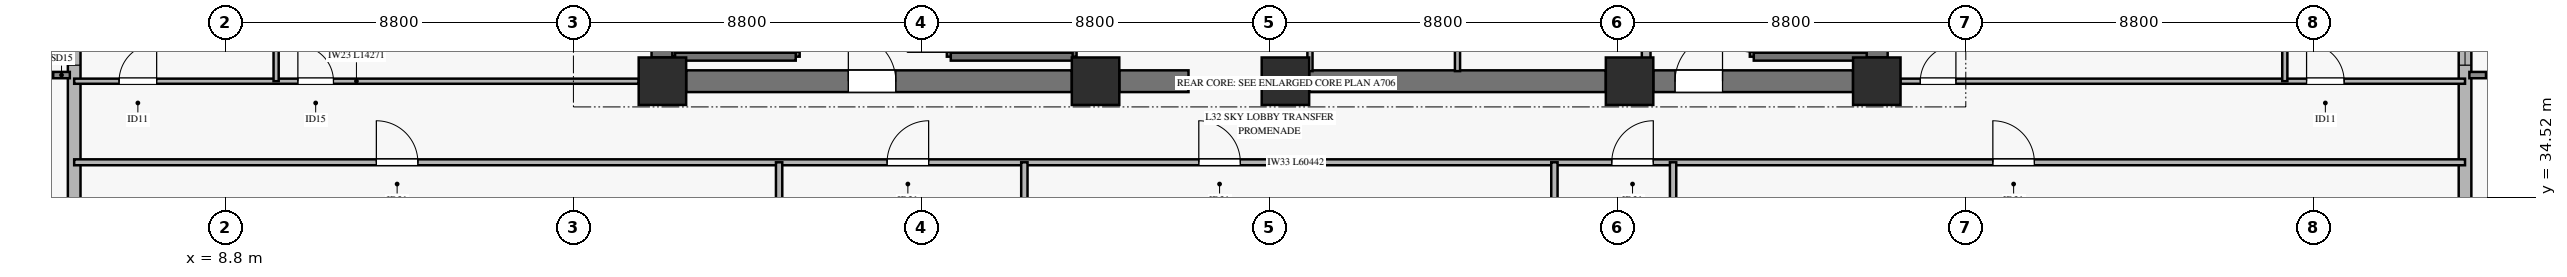
"""IFC4 building model, lengths in metres.
Left out: names, types, materials, properties, quantities, classifications, styles, units other than length and angle.
Written with IfcOpenShell. Run it as: python <this file> out.ifc"""

import sys

from ifc_helpers import new_model, si_unit, direction, frame, frame_2d, origin, origin_2d, place, context, subcontext, project, spatial, rectangle, extrude, source, transform, mapped, element, fill, save


model = new_model("IFC4")
c1 = context("Model", 3, precision=1e-05, world=origin(), true_north=direction((0.0, 1.0)))
c2 = subcontext(c1, "Body", "Model", "MODEL_VIEW")
j1 = project(units=[si_unit("LENGTHUNIT", "METRE"), si_unit("PLANEANGLEUNIT", "RADIAN")], contexts=[c1])
p1 = place(None, origin())
s1 = spatial("IfcSite", under=j1, at=p1, CompositionType="ELEMENT")
p2 = place(p1, origin())
s2 = spatial("IfcBuilding", under=s1, at=p2, CompositionType="ELEMENT")
p3 = place(p2, frame((0.0, 0.0, 130.9)))
s3 = spatial("IfcBuildingStorey", under=s2, at=p3, CompositionType="ELEMENT", Elevation=130.9)
m1 = source(origin(), c2, "Body", "SweptSolid", [
    extrude(rectangle(XDim=1.2, YDim=1.2, at=origin_2d()), origin(), (0.0, 0.0, 1.0), 6.57),
])
for number, where, z_axis, x_axis in (
    (1, (19.85, 37.45, 0.0), (0.0, 0.0, 1.0), (1.0, 0.0, 0.0)),
    (2, (30.8, 37.45, 0.0), (0.0, 0.0, 1.0), (1.0, 0.0, 0.0)),
    (3, (35.6, 37.45, 0.0), (0.0, 0.0, 1.0), (1.0, 0.0, 0.0)),
    (4, (44.3, 37.45, 0.0), (0.0, 0.0, 1.0), (1.0, 0.0, 0.0)),
    (5, (50.55, 37.45, 0.0), (0.0, 0.0, 1.0), (1.0, 0.0, 0.0)),
):
    element("IfcColumn", number, at=place(p3, frame(where, z_axis=z_axis, x_axis=x_axis)), inside=s3, PredefinedType="PILASTER", context=c2, shape_type="MappedRepresentation", body=[
        mapped(m1, transform((0.0, 0.0, 0.0), x_axis=(1.0, 0.0, 0.0), y_axis=(0.0, 1.0, 0.0), z_axis=(0.0, 0.0, 1.0), scale=1.0)),
    ])
p4 = place(p3, frame((20.45, 37.45, 0.0), z_axis=(0.0, 0.0, 1.0), x_axis=(1.0, 0.0, 0.0)))
e6 = element("IfcWall", 6, at=p4, inside=s3, PredefinedType="SHEAR", context=c2, shape_type="SweptSolid", body=[
    extrude(rectangle(XDim=9.75, YDim=0.55, at=frame_2d((4.875, 0.0))), origin(), (0.0, 0.0, 1.0), 6.57),
])
p5 = place(p4, frame((4.1, 0.0, 0.0)))
e7 = element("IfcOpeningElement", 7, at=p5, cuts=e6, PredefinedType="OPENING", context=c2, shape_type="SweptSolid", body=[
    extrude(rectangle(XDim=1.2, YDim=2.15, at=frame_2d((0.6, 1.075))), frame((0.0, 0.285, 0.0), z_axis=(0.0, -1.0, 0.0), x_axis=(1.0, 0.0, 0.0)), (0.0, 0.0, 1.0), 0.57),
])
p6 = place(p3, frame((31.4, 37.45, 0.0), z_axis=(0.0, 0.0, 1.0), x_axis=(1.0, 0.0, 0.0)))
e8 = element("IfcWall", 8, at=p6, inside=s3, PredefinedType="SHEAR", context=c2, shape_type="SweptSolid", body=[
    extrude(rectangle(XDim=1.75, YDim=0.55, at=frame_2d((0.875, 0.0))), origin(), (0.0, 0.0, 1.0), 6.57),
])
p7 = place(p3, frame((36.2, 37.45, 0.0), z_axis=(0.0, 0.0, 1.0), x_axis=(1.0, 0.0, 0.0)))
e9 = element("IfcWall", 9, at=p7, inside=s3, PredefinedType="SHEAR", context=c2, shape_type="SweptSolid", body=[
    extrude(rectangle(XDim=7.5, YDim=0.55, at=frame_2d((3.75, 0.0))), origin(), (0.0, 0.0, 1.0), 6.57),
])
p8 = place(p3, frame((44.9, 37.45, 0.0), z_axis=(0.0, 0.0, 1.0), x_axis=(1.0, 0.0, 0.0)))
e10 = element("IfcWall", 10, at=p8, inside=s3, PredefinedType="SHEAR", context=c2, shape_type="SweptSolid", body=[
    extrude(rectangle(XDim=5.05, YDim=0.55, at=frame_2d((2.525, 0.0))), origin(), (0.0, 0.0, 1.0), 6.57),
])
p9 = place(p8, frame((0.55, 0.0, 0.0)))
e11 = element("IfcOpeningElement", 11, at=p9, cuts=e10, PredefinedType="OPENING", context=c2, shape_type="SweptSolid", body=[
    extrude(rectangle(XDim=1.2, YDim=2.15, at=frame_2d((0.6, 1.075))), frame((0.0, 0.285, 0.0), z_axis=(0.0, -1.0, 0.0), x_axis=(1.0, 0.0, 0.0)), (0.0, 0.0, 1.0), 0.57),
])
for number, where, z_axis, x_axis in (
    (12, (19.85, 38.05, 0.0), (0.0, 0.0, 1.0), (0.0, 1.0, 0.0)),
    (13, (50.55, 38.05, 0.0), (0.0, 0.0, 1.0), (0.0, 1.0, 0.0)),
):
    element("IfcWall", number, at=place(p3, frame(where, z_axis=z_axis, x_axis=x_axis)), inside=s3, PredefinedType="SHEAR", context=c2, shape_type="SweptSolid", body=[
        extrude(rectangle(XDim=7.9, YDim=0.55, at=frame_2d((3.95, 0.0))), origin(), (0.0, 0.0, 1.0), 6.57),
    ])
p10 = place(p3, frame((4.979, 27.259, 0.0), z_axis=(0.0, 0.0, 1.0), x_axis=(0.0, 1.0, 0.0)))
e14 = element("IfcWall", 14, at=p10, inside=s3, PredefinedType="SOLIDWALL", context=c2, shape_type="SweptSolid", body=[
    extrude(rectangle(XDim=15.85, YDim=0.32, at=frame_2d((7.925, 0.0))), origin(), (0.0, 0.0, 1.0), 6.05),
])
p11 = place(p10, frame((10.596, 0.0, 0.45)))
e15 = element("IfcOpeningElement", 15, at=p11, cuts=e14, PredefinedType="OPENING", context=c2, shape_type="SweptSolid", body=[
    extrude(rectangle(XDim=2.6, YDim=2.4, at=frame_2d((1.3, 1.2))), frame((0.0, 0.17, 0.0), z_axis=(0.0, -1.0, 0.0), x_axis=(1.0, 0.0, 0.0)), (0.0, 0.0, 1.0), 0.34),
])
p12 = place(p3, frame((65.421, 27.259, 0.0), z_axis=(0.0, 0.0, 1.0), x_axis=(0.0, 1.0, 0.0)))
e16 = element("IfcWall", 16, at=p12, inside=s3, PredefinedType="SOLIDWALL", context=c2, shape_type="SweptSolid", body=[
    extrude(rectangle(XDim=15.85, YDim=0.32, at=frame_2d((7.925, 0.0))), origin(), (0.0, 0.0, 1.0), 6.05),
])
p13 = place(p12, frame((10.596, 0.0, 0.45)))
e17 = element("IfcOpeningElement", 17, at=p13, cuts=e16, PredefinedType="OPENING", context=c2, shape_type="SweptSolid", body=[
    extrude(rectangle(XDim=2.6, YDim=2.4, at=frame_2d((1.3, 1.2))), frame((0.0, 0.17, 0.0), z_axis=(0.0, -1.0, 0.0), x_axis=(1.0, 0.0, 0.0)), (0.0, 0.0, 1.0), 0.34),
])
p14 = place(p3, frame((20.17, 38.07, 0.0), z_axis=(0.0, 0.0, 1.0), x_axis=(0.0, 1.0, 0.0)))
e18 = element("IfcWall", 18, at=p14, inside=s3, PredefinedType="SOLIDWALL", context=c2, shape_type="SweptSolid", body=[
    extrude(rectangle(XDim=7.25, YDim=0.14, at=frame_2d((3.625, 0.0))), origin(), (0.0, 0.0, 1.0), 6.8),
])
p15 = place(p3, frame((23.22, 38.07, 0.0), z_axis=(0.0, 0.0, 1.0), x_axis=(0.0, 1.0, 0.0)))
e19 = element("IfcWall", 19, at=p15, inside=s3, PredefinedType="SOLIDWALL", context=c2, shape_type="SweptSolid", body=[
    extrude(rectangle(XDim=7.25, YDim=0.2, at=frame_2d((3.625, 0.0))), origin(), (0.0, 0.0, 1.0), 6.8),
])
p16 = place(p15, frame((0.11, 0.0, 0.0)))
e20 = element("IfcOpeningElement", 20, at=p16, cuts=e19, PredefinedType="OPENING", context=c2, shape_type="SweptSolid", body=[
    extrude(rectangle(XDim=1.1, YDim=2.15, at=frame_2d((0.55, 1.075))), frame((0.0, 0.11, 0.0), z_axis=(0.0, -1.0, 0.0), x_axis=(1.0, 0.0, 0.0)), (0.0, 0.0, 1.0), 0.22),
])
p17 = place(p3, frame((20.17, 38.07, 0.0), z_axis=(0.0, 0.0, 1.0), x_axis=(1.0, 0.0, 0.0)))
e21 = element("IfcWall", 21, at=p17, inside=s3, PredefinedType="SOLIDWALL", context=c2, shape_type="SweptSolid", body=[
    extrude(rectangle(XDim=3.05, YDim=0.2, at=frame_2d((1.525, 0.0))), origin(), (0.0, 0.0, 1.0), 6.8),
])
p18 = place(p3, frame((27.14, 38.07, 0.0), z_axis=(0.0, 0.0, 1.0), x_axis=(0.0, 1.0, 0.0)))
e22 = element("IfcWall", 22, at=p18, inside=s3, PredefinedType="SOLIDWALL", context=c2, shape_type="SweptSolid", body=[
    extrude(rectangle(XDim=7.25, YDim=0.2, at=frame_2d((3.625, 0.0))), origin(), (0.0, 0.0, 1.0), 6.8),
])
p19 = place(p18, frame((0.11, 0.0, 0.0)))
e23 = element("IfcOpeningElement", 23, at=p19, cuts=e22, PredefinedType="OPENING", context=c2, shape_type="SweptSolid", body=[
    extrude(rectangle(XDim=1.1, YDim=2.15, at=frame_2d((0.55, 1.075))), frame((0.0, 0.11, 0.0), z_axis=(0.0, -1.0, 0.0), x_axis=(1.0, 0.0, 0.0)), (0.0, 0.0, 1.0), 0.22),
])
p20 = place(p3, frame((30.22, 38.07, 0.0), z_axis=(0.0, 0.0, 1.0), x_axis=(0.0, 1.0, 0.0)))
e24 = element("IfcWall", 24, at=p20, inside=s3, PredefinedType="SOLIDWALL", context=c2, shape_type="SweptSolid", body=[
    extrude(rectangle(XDim=7.25, YDim=0.2, at=frame_2d((3.625, 0.0))), origin(), (0.0, 0.0, 1.0), 6.8),
])
p21 = place(p3, frame((27.14, 38.07, 0.0), z_axis=(0.0, 0.0, 1.0), x_axis=(1.0, 0.0, 0.0)))
e25 = element("IfcWall", 25, at=p21, inside=s3, PredefinedType="SOLIDWALL", context=c2, shape_type="SweptSolid", body=[
    extrude(rectangle(XDim=3.08, YDim=0.2, at=frame_2d((1.54, 0.0))), origin(), (0.0, 0.0, 1.0), 6.8),
])
p22 = place(p3, frame((47.44, 38.07, 0.0), z_axis=(0.0, 0.0, 1.0), x_axis=(0.0, 1.0, 0.0)))
e26 = element("IfcWall", 26, at=p22, inside=s3, PredefinedType="SOLIDWALL", context=c2, shape_type="SweptSolid", body=[
    extrude(rectangle(XDim=7.25, YDim=0.2, at=frame_2d((3.625, 0.0))), origin(), (0.0, 0.0, 1.0), 6.8),
])
p23 = place(p22, frame((0.11, 0.0, 0.0)))
e27 = element("IfcOpeningElement", 27, at=p23, cuts=e26, PredefinedType="OPENING", context=c2, shape_type="SweptSolid", body=[
    extrude(rectangle(XDim=1.1, YDim=2.15, at=frame_2d((0.55, 1.075))), frame((0.0, 0.11, 0.0), z_axis=(0.0, -1.0, 0.0), x_axis=(1.0, 0.0, 0.0)), (0.0, 0.0, 1.0), 0.22),
])
p24 = place(p3, frame((47.44, 38.07, 0.0), z_axis=(0.0, 0.0, 1.0), x_axis=(1.0, 0.0, 0.0)))
e28 = element("IfcWall", 28, at=p24, inside=s3, PredefinedType="SOLIDWALL", context=c2, shape_type="SweptSolid", body=[
    extrude(rectangle(XDim=2.855, YDim=0.2, at=frame_2d((1.427, 0.0))), origin(), (0.0, 0.0, 1.0), 6.8),
])
p25 = place(p3, frame((44.72, 37.705, 0.0), z_axis=(0.0, 0.0, 1.0), x_axis=(0.0, 1.0, 0.0)))
e29 = element("IfcWall", 29, at=p25, inside=s3, PredefinedType="SOLIDWALL", context=c2, shape_type="SweptSolid", body=[
    extrude(rectangle(XDim=7.515, YDim=0.22, at=frame_2d((3.757, 0.0))), origin(), (0.0, 0.0, 1.0), 6.57),
])
p26 = place(p3, frame((36.22, 37.705, 0.0), z_axis=(0.0, 0.0, 1.0), x_axis=(0.0, 1.0, 0.0)))
e30 = element("IfcWall", 30, at=p26, inside=s3, PredefinedType="PARTITIONING", context=c2, shape_type="SweptSolid", body=[
    extrude(rectangle(XDim=2.215, YDim=0.13, at=frame_2d((1.107, 0.0))), origin(), (0.0, 0.0, 1.0), 6.57),
])
p27 = place(p26, frame((0.905, 0.0, 0.0)))
e31 = element("IfcOpeningElement", 31, at=p27, cuts=e30, PredefinedType="OPENING", context=c2, shape_type="SweptSolid", body=[
    extrude(rectangle(XDim=0.9, YDim=2.1, at=frame_2d((0.45, 1.05))), frame((0.0, 0.075, 0.0), z_axis=(0.0, -1.0, 0.0), x_axis=(1.0, 0.0, 0.0)), (0.0, 0.0, 1.0), 0.15),
])
p28 = place(p3, frame((39.95, 37.705, 0.0), z_axis=(0.0, 0.0, 1.0), x_axis=(0.0, 1.0, 0.0)))
e32 = element("IfcWall", 32, at=p28, inside=s3, PredefinedType="PARTITIONING", context=c2, shape_type="SweptSolid", body=[
    extrude(rectangle(XDim=2.215, YDim=0.13, at=frame_2d((1.107, 0.0))), origin(), (0.0, 0.0, 1.0), 6.57),
])
p29 = place(p28, frame((0.615, 0.0, 0.0)))
e33 = element("IfcOpeningElement", 33, at=p29, cuts=e32, PredefinedType="OPENING", context=c2, shape_type="SweptSolid", body=[
    extrude(rectangle(XDim=0.9, YDim=2.1, at=frame_2d((0.45, 1.05))), frame((0.0, 0.075, 0.0), z_axis=(0.0, -1.0, 0.0), x_axis=(1.0, 0.0, 0.0)), (0.0, 0.0, 1.0), 0.15),
])
p30 = place(p3, frame((4.979, 35.4, 0.0), z_axis=(0.0, 0.0, 1.0), x_axis=(1.0, 0.0, 0.0)))
e34 = element("IfcWall", 34, at=p30, inside=s3, PredefinedType="PARTITIONING", context=c2, shape_type="SweptSolid", body=[
    extrude(rectangle(XDim=60.442, YDim=0.15, at=frame_2d((30.221, 0.0))), origin(), (0.0, 0.0, 1.0), 5.655),
])
p31 = place(p30, frame((7.639, 0.0, 0.0)))
e35 = element("IfcOpeningElement", 35, at=p31, cuts=e34, PredefinedType="OPENING", context=c2, shape_type="SweptSolid", body=[
    extrude(rectangle(XDim=1.05, YDim=2.15, at=frame_2d((0.525, 1.075))), frame((0.0, 0.085, 0.0), z_axis=(0.0, -1.0, 0.0), x_axis=(1.0, 0.0, 0.0)), (0.0, 0.0, 1.0), 0.17),
])
p32 = place(p30, frame((20.551, 0.0, 0.0)))
e36 = element("IfcOpeningElement", 36, at=p32, cuts=e34, PredefinedType="OPENING", context=c2, shape_type="SweptSolid", body=[
    extrude(rectangle(XDim=1.05, YDim=2.15, at=frame_2d((0.525, 1.075))), frame((0.0, 0.085, 0.0), z_axis=(0.0, -1.0, 0.0), x_axis=(1.0, 0.0, 0.0)), (0.0, 0.0, 1.0), 0.17),
])
p33 = place(p30, frame((28.431, 0.0, 0.0)))
e37 = element("IfcOpeningElement", 37, at=p33, cuts=e34, PredefinedType="OPENING", context=c2, shape_type="SweptSolid", body=[
    extrude(rectangle(XDim=1.05, YDim=2.15, at=frame_2d((0.525, 1.075))), frame((0.0, 0.085, 0.0), z_axis=(0.0, -1.0, 0.0), x_axis=(1.0, 0.0, 0.0)), (0.0, 0.0, 1.0), 0.17),
])
p34 = place(p30, frame((38.871, 0.0, 0.0)))
e38 = element("IfcOpeningElement", 38, at=p34, cuts=e34, PredefinedType="OPENING", context=c2, shape_type="SweptSolid", body=[
    extrude(rectangle(XDim=1.05, YDim=2.15, at=frame_2d((0.525, 1.075))), frame((0.0, 0.085, 0.0), z_axis=(0.0, -1.0, 0.0), x_axis=(1.0, 0.0, 0.0)), (0.0, 0.0, 1.0), 0.17),
])
p35 = place(p30, frame((48.505, 0.0, 0.0)))
e39 = element("IfcOpeningElement", 39, at=p35, cuts=e34, PredefinedType="OPENING", context=c2, shape_type="SweptSolid", body=[
    extrude(rectangle(XDim=1.05, YDim=2.15, at=frame_2d((0.525, 1.075))), frame((0.0, 0.085, 0.0), z_axis=(0.0, -1.0, 0.0), x_axis=(1.0, 0.0, 0.0)), (0.0, 0.0, 1.0), 0.17),
])
for number, where, z_axis, x_axis in (
    (40, (22.8, 7.518, 0.0), (0.0, 0.0, 1.0), (0.0, 1.0, 0.0)),
    (41, (29.0, 7.518, 0.0), (0.0, 0.0, 1.0), (0.0, 1.0, 0.0)),
    (42, (42.4, 7.518, 0.0), (0.0, 0.0, 1.0), (0.0, 1.0, 0.0)),
    (43, (45.4, 7.518, 0.0), (0.0, 0.0, 1.0), (0.0, 1.0, 0.0)),
):
    element("IfcWall", number, at=place(p3, frame(where, z_axis=z_axis, x_axis=x_axis)), inside=s3, PredefinedType="PARTITIONING", context=c2, shape_type="SweptSolid", body=[
        extrude(rectangle(XDim=27.882, YDim=0.16, at=frame_2d((13.941, 0.0))), origin(), (0.0, 0.0, 1.0), 6.055),
    ])
p36 = place(p3, frame((4.979, 37.45, 0.0), z_axis=(0.0, 0.0, 1.0), x_axis=(1.0, 0.0, 0.0)))
e44 = element("IfcWall", 44, at=p36, inside=s3, PredefinedType="PARTITIONING", context=c2, shape_type="SweptSolid", body=[
    extrude(rectangle(XDim=14.271, YDim=0.13, at=frame_2d((7.135, 0.0))), origin(), (0.0, 0.0, 1.0), 6.055),
])
p37 = place(p36, frame((1.135, 0.0, 0.0)))
e45 = element("IfcOpeningElement", 45, at=p37, cuts=e44, PredefinedType="OPENING", context=c2, shape_type="SweptSolid", body=[
    extrude(rectangle(XDim=0.95, YDim=2.1, at=frame_2d((0.475, 1.05))), frame((0.0, 0.075, 0.0), z_axis=(0.0, -1.0, 0.0), x_axis=(1.0, 0.0, 0.0)), (0.0, 0.0, 1.0), 0.15),
])
p38 = place(p36, frame((5.655, 0.0, 0.0)))
e46 = element("IfcOpeningElement", 46, at=p38, cuts=e44, PredefinedType="OPENING", context=c2, shape_type="SweptSolid", body=[
    extrude(rectangle(XDim=0.9, YDim=2.1, at=frame_2d((0.45, 1.05))), frame((0.0, 0.075, 0.0), z_axis=(0.0, -1.0, 0.0), x_axis=(1.0, 0.0, 0.0)), (0.0, 0.0, 1.0), 0.15),
])
p39 = place(p3, frame((10.084, 37.45, 0.0), z_axis=(0.0, 0.0, 1.0), x_axis=(0.0, 1.0, 0.0)))
e47 = element("IfcWall", 47, at=p39, inside=s3, PredefinedType="PARTITIONING", context=c2, shape_type="SweptSolid", body=[
    extrude(rectangle(XDim=8.8, YDim=0.13, at=frame_2d((4.4, 0.0))), origin(), (0.0, 0.0, 1.0), 6.57),
])
p40 = place(p3, frame((51.15, 37.45, 0.0), z_axis=(0.0, 0.0, 1.0), x_axis=(1.0, 0.0, 0.0)))
e48 = element("IfcWall", 48, at=p40, inside=s3, PredefinedType="PARTITIONING", context=c2, shape_type="SweptSolid", body=[
    extrude(rectangle(XDim=14.271, YDim=0.13, at=frame_2d((7.135, 0.0))), origin(), (0.0, 0.0, 1.0), 6.055),
])
p41 = place(p40, frame((0.5, 0.0, 0.0)))
e49 = element("IfcOpeningElement", 49, at=p41, cuts=e48, PredefinedType="OPENING", context=c2, shape_type="SweptSolid", body=[
    extrude(rectangle(XDim=0.9, YDim=2.1, at=frame_2d((0.45, 1.05))), frame((0.0, 0.075, 0.0), z_axis=(0.0, -1.0, 0.0), x_axis=(1.0, 0.0, 0.0)), (0.0, 0.0, 1.0), 0.15),
])
p42 = place(p40, frame((10.265, 0.0, 0.0)))
e50 = element("IfcOpeningElement", 50, at=p42, cuts=e48, PredefinedType="OPENING", context=c2, shape_type="SweptSolid", body=[
    extrude(rectangle(XDim=0.95, YDim=2.1, at=frame_2d((0.475, 1.05))), frame((0.0, 0.075, 0.0), z_axis=(0.0, -1.0, 0.0), x_axis=(1.0, 0.0, 0.0)), (0.0, 0.0, 1.0), 0.15),
])
p43 = place(p3, frame((60.865, 37.45, 0.0), z_axis=(0.0, 0.0, 1.0), x_axis=(0.0, 1.0, 0.0)))
e51 = element("IfcWall", 51, at=p43, inside=s3, PredefinedType="PARTITIONING", context=c2, shape_type="SweptSolid", body=[
    extrude(rectangle(XDim=8.8, YDim=0.13, at=frame_2d((4.4, 0.0))), origin(), (0.0, 0.0, 1.0), 6.57),
])
m2 = source(origin(), c2, "Body", "SweptSolid", [
    extrude(rectangle(XDim=2.6, YDim=2.4, at=frame_2d((1.3, 1.2))), frame((0.0, 0.03, 0.0), z_axis=(0.0, -1.0, 0.0), x_axis=(1.0, 0.0, 0.0)), (0.0, 0.0, 1.0), 0.06),
])
p44 = place(p11, origin())
e52 = element("IfcWindow", 52, at=p44, inside=s3, PartitioningType="SINGLE_PANEL", PredefinedType="WINDOW", context=c2, shape_type="MappedRepresentation", body=[
    mapped(m2, transform((0.0, 0.0, 0.0), x_axis=(1.0, 0.0, 0.0), y_axis=(0.0, 1.0, 0.0), z_axis=(0.0, 0.0, 1.0), scale=1.0)),
])
fill(e15, e52)
p45 = place(p13, origin())
e53 = element("IfcWindow", 53, at=p45, inside=s3, PartitioningType="SINGLE_PANEL", PredefinedType="WINDOW", context=c2, shape_type="MappedRepresentation", body=[
    mapped(m2, transform((0.0, 0.0, 0.0), x_axis=(1.0, 0.0, 0.0), y_axis=(0.0, 1.0, 0.0), z_axis=(0.0, 0.0, 1.0), scale=1.0)),
])
fill(e17, e53)
m3 = source(origin(), c2, "Body", "SweptSolid", [
    extrude(rectangle(XDim=1.2, YDim=2.15, at=frame_2d((0.6, 1.075))), frame((0.0, 0.025, 0.0), z_axis=(0.0, -1.0, 0.0), x_axis=(1.0, 0.0, 0.0)), (0.0, 0.0, 1.0), 0.05),
])
p46 = place(p5, origin())
e54 = element("IfcDoor", 54, at=p46, inside=s3, OperationType="SINGLE_SWING_LEFT", PredefinedType="DOOR", context=c2, shape_type="MappedRepresentation", body=[
    mapped(m3, transform((0.0, 0.0, 0.0), x_axis=(1.0, 0.0, 0.0), y_axis=(0.0, 1.0, 0.0), z_axis=(0.0, 0.0, 1.0), scale=1.0)),
])
fill(e7, e54)
p47 = place(p9, origin())
e55 = element("IfcDoor", 55, at=p47, inside=s3, OperationType="SINGLE_SWING_RIGHT", PredefinedType="DOOR", context=c2, shape_type="MappedRepresentation", body=[
    mapped(m3, transform((0.0, 0.0, 0.0), x_axis=(1.0, 0.0, 0.0), y_axis=(0.0, 1.0, 0.0), z_axis=(0.0, 0.0, 1.0), scale=1.0)),
])
fill(e11, e55)
m4 = source(origin(), c2, "Body", "SweptSolid", [
    extrude(rectangle(XDim=1.05, YDim=2.15, at=frame_2d((0.525, 1.075))), frame((0.0, 0.025, 0.0), z_axis=(0.0, -1.0, 0.0), x_axis=(1.0, 0.0, 0.0)), (0.0, 0.0, 1.0), 0.05),
])
p48 = place(p31, origin())
e56 = element("IfcDoor", 56, at=p48, inside=s3, OperationType="SINGLE_SWING_LEFT", PredefinedType="DOOR", context=c2, shape_type="MappedRepresentation", body=[
    mapped(m4, transform((0.0, 0.0, 0.0), x_axis=(1.0, 0.0, 0.0), y_axis=(0.0, 1.0, 0.0), z_axis=(0.0, 0.0, 1.0), scale=1.0)),
])
fill(e35, e56)
p49 = place(p32, origin())
e57 = element("IfcDoor", 57, at=p49, inside=s3, OperationType="SINGLE_SWING_RIGHT", PredefinedType="DOOR", context=c2, shape_type="MappedRepresentation", body=[
    mapped(m4, transform((0.0, 0.0, 0.0), x_axis=(1.0, 0.0, 0.0), y_axis=(0.0, 1.0, 0.0), z_axis=(0.0, 0.0, 1.0), scale=1.0)),
])
fill(e36, e57)
p50 = place(p33, origin())
e58 = element("IfcDoor", 58, at=p50, inside=s3, OperationType="SINGLE_SWING_LEFT", PredefinedType="DOOR", context=c2, shape_type="MappedRepresentation", body=[
    mapped(m4, transform((0.0, 0.0, 0.0), x_axis=(1.0, 0.0, 0.0), y_axis=(0.0, 1.0, 0.0), z_axis=(0.0, 0.0, 1.0), scale=1.0)),
])
fill(e37, e58)
p51 = place(p34, origin())
e59 = element("IfcDoor", 59, at=p51, inside=s3, OperationType="SINGLE_SWING_RIGHT", PredefinedType="DOOR", context=c2, shape_type="MappedRepresentation", body=[
    mapped(m4, transform((0.0, 0.0, 0.0), x_axis=(1.0, 0.0, 0.0), y_axis=(0.0, 1.0, 0.0), z_axis=(0.0, 0.0, 1.0), scale=1.0)),
])
fill(e38, e59)
p52 = place(p35, origin())
e60 = element("IfcDoor", 60, at=p52, inside=s3, OperationType="SINGLE_SWING_LEFT", PredefinedType="DOOR", context=c2, shape_type="MappedRepresentation", body=[
    mapped(m4, transform((0.0, 0.0, 0.0), x_axis=(1.0, 0.0, 0.0), y_axis=(0.0, 1.0, 0.0), z_axis=(0.0, 0.0, 1.0), scale=1.0)),
])
fill(e39, e60)
m5 = source(origin(), c2, "Body", "SweptSolid", [
    extrude(rectangle(XDim=0.95, YDim=2.1, at=frame_2d((0.475, 1.05))), frame((0.0, 0.025, 0.0), z_axis=(0.0, -1.0, 0.0), x_axis=(1.0, 0.0, 0.0)), (0.0, 0.0, 1.0), 0.05),
])
p53 = place(p37, origin())
e61 = element("IfcDoor", 61, at=p53, inside=s3, OperationType="SINGLE_SWING_RIGHT", PredefinedType="DOOR", context=c2, shape_type="MappedRepresentation", body=[
    mapped(m5, transform((0.0, 0.0, 0.0), x_axis=(1.0, 0.0, 0.0), y_axis=(0.0, 1.0, 0.0), z_axis=(0.0, 0.0, 1.0), scale=1.0)),
])
fill(e45, e61)
m6 = source(origin(), c2, "Body", "SweptSolid", [
    extrude(rectangle(XDim=0.9, YDim=2.1, at=frame_2d((0.45, 1.05))), frame((0.0, 0.025, 0.0), z_axis=(0.0, -1.0, 0.0), x_axis=(1.0, 0.0, 0.0)), (0.0, 0.0, 1.0), 0.05),
])
p54 = place(p38, origin())
e62 = element("IfcDoor", 62, at=p54, inside=s3, OperationType="SINGLE_SWING_LEFT", PredefinedType="DOOR", context=c2, shape_type="MappedRepresentation", body=[
    mapped(m6, transform((0.0, 0.0, 0.0), x_axis=(1.0, 0.0, 0.0), y_axis=(0.0, 1.0, 0.0), z_axis=(0.0, 0.0, 1.0), scale=1.0)),
])
fill(e46, e62)
p55 = place(p41, origin())
e63 = element("IfcDoor", 63, at=p55, inside=s3, OperationType="SINGLE_SWING_RIGHT", PredefinedType="DOOR", context=c2, shape_type="MappedRepresentation", body=[
    mapped(m6, transform((0.0, 0.0, 0.0), x_axis=(1.0, 0.0, 0.0), y_axis=(0.0, 1.0, 0.0), z_axis=(0.0, 0.0, 1.0), scale=1.0)),
])
fill(e49, e63)
p56 = place(p42, origin())
e64 = element("IfcDoor", 64, at=p56, inside=s3, OperationType="SINGLE_SWING_LEFT", PredefinedType="DOOR", context=c2, shape_type="MappedRepresentation", body=[
    mapped(m5, transform((0.0, 0.0, 0.0), x_axis=(1.0, 0.0, 0.0), y_axis=(0.0, 1.0, 0.0), z_axis=(0.0, 0.0, 1.0), scale=1.0)),
])
fill(e50, e64)
save(model, sys.argv[1])
